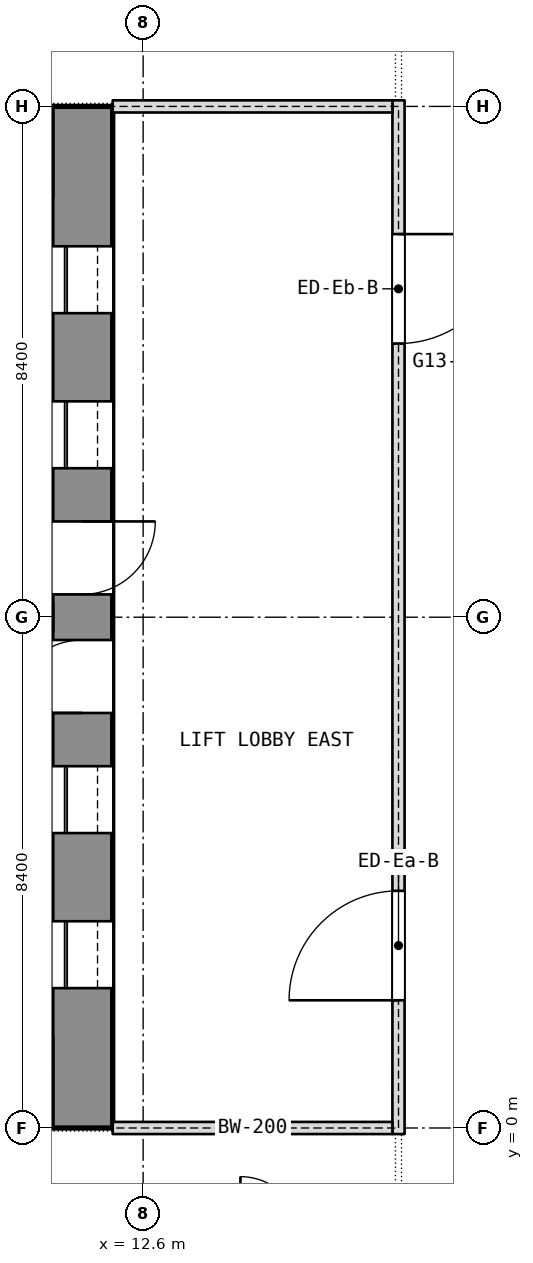
"""IFC4 building model, lengths in metres.
Left out: names, types, materials, properties, quantities, classifications, styles, units other than length and angle.
Written with IfcOpenShell. Run it as: python <this file> out.ifc"""

import sys

from ifc_helpers import new_model, si_unit, direction, frame, frame_2d, origin, place, context, subcontext, project, spatial, rectangle, extrude, element, fill, save


model = new_model("IFC4")
c1 = context("Model", 3, precision=1e-05, world=origin(), true_north=direction((0.0, 1.0)))
c2 = subcontext(c1, "Body", "Model", "MODEL_VIEW")
j1 = project(units=[si_unit("LENGTHUNIT", "METRE"), si_unit("PLANEANGLEUNIT", "RADIAN")], contexts=[c1])
p1 = place(None, origin())
s1 = spatial("IfcSite", under=j1, at=p1, CompositionType="ELEMENT")
p2 = place(p1, origin())
s2 = spatial("IfcBuilding", under=s1, at=p2, CompositionType="ELEMENT")
p3 = place(p2, frame((0.0, 0.0, 155.3)))
s3 = spatial("IfcBuildingStorey", under=s2, at=p3, CompositionType="ELEMENT", Elevation=155.3)
p4 = place(p3, frame((11.6, 0.0, 0.0), z_axis=(0.0, 0.0, 1.0), x_axis=(0.0, 1.0, 0.0)))
e1 = element("IfcWall", 1, at=p4, inside=s3, PredefinedType="SHEAR", context=c2, shape_type="SweptSolid", body=[
    extrude(rectangle(XDim=16.8, YDim=1.0, at=frame_2d((8.4, 0.0))), origin(), (0.0, 0.0, 1.0), 3.6),
])
p5 = place(p4, frame((2.3, 0.0, 0.0)))
e2 = element("IfcOpeningElement", 2, at=p5, cuts=e1, PredefinedType="OPENING", context=c2, shape_type="SweptSolid", body=[
    extrude(rectangle(XDim=1.1, YDim=2.1, at=frame_2d((0.55, 1.05))), frame((0.0, 0.5, 0.0), z_axis=(0.0, -1.0, 0.0), x_axis=(1.0, 0.0, 0.0)), (0.0, 0.0, 1.0), 1.0),
])
p6 = place(p4, frame((4.85, 0.0, 0.0)))
e3 = element("IfcOpeningElement", 3, at=p6, cuts=e1, PredefinedType="OPENING", context=c2, shape_type="SweptSolid", body=[
    extrude(rectangle(XDim=1.1, YDim=2.1, at=frame_2d((0.55, 1.05))), frame((0.0, 0.5, 0.0), z_axis=(0.0, -1.0, 0.0), x_axis=(1.0, 0.0, 0.0)), (0.0, 0.0, 1.0), 1.0),
])
p7 = place(p4, frame((6.825, 0.0, 0.0)))
e4 = element("IfcOpeningElement", 4, at=p7, cuts=e1, PredefinedType="OPENING", context=c2, shape_type="SweptSolid", body=[
    extrude(rectangle(XDim=1.2, YDim=2.1, at=frame_2d((0.6, 1.05))), frame((0.0, 0.5, 0.0), z_axis=(0.0, -1.0, 0.0), x_axis=(1.0, 0.0, 0.0)), (0.0, 0.0, 1.0), 1.0),
])
p8 = place(p4, frame((13.4, 0.0, 0.0)))
e5 = element("IfcOpeningElement", 5, at=p8, cuts=e1, PredefinedType="OPENING", context=c2, shape_type="SweptSolid", body=[
    extrude(rectangle(XDim=1.1, YDim=2.1, at=frame_2d((0.55, 1.05))), frame((0.0, 0.5, 0.0), z_axis=(0.0, -1.0, 0.0), x_axis=(1.0, 0.0, 0.0)), (0.0, 0.0, 1.0), 1.0),
])
p9 = place(p4, frame((10.85, 0.0, 0.0)))
e6 = element("IfcOpeningElement", 6, at=p9, cuts=e1, PredefinedType="OPENING", context=c2, shape_type="SweptSolid", body=[
    extrude(rectangle(XDim=1.1, YDim=2.1, at=frame_2d((0.55, 1.05))), frame((0.0, 0.5, 0.0), z_axis=(0.0, -1.0, 0.0), x_axis=(1.0, 0.0, 0.0)), (0.0, 0.0, 1.0), 1.0),
])
p10 = place(p4, frame((8.775, 0.0, 0.0)))
e7 = element("IfcOpeningElement", 7, at=p10, cuts=e1, PredefinedType="OPENING", context=c2, shape_type="SweptSolid", body=[
    extrude(rectangle(XDim=1.2, YDim=2.1, at=frame_2d((0.6, 1.05))), frame((0.0, 0.5, 0.0), z_axis=(0.0, -1.0, 0.0), x_axis=(1.0, 0.0, 0.0)), (0.0, 0.0, 1.0), 1.0),
])
p11 = place(p3, frame((16.8, -0.1, 0.0), z_axis=(0.0, 0.0, 1.0), x_axis=(0.0, 1.0, 0.0)))
e8 = element("IfcWall", 8, at=p11, inside=s3, PredefinedType="PARTITIONING", context=c2, shape_type="SweptSolid", body=[
    extrude(rectangle(XDim=17.0, YDim=0.2, at=frame_2d((8.5, 0.0))), origin(), (0.0, 0.0, 1.0), 3.34),
])
p12 = place(p11, frame((2.2, 0.0, 0.0)))
e9 = element("IfcOpeningElement", 9, at=p12, cuts=e8, PredefinedType="OPENING", context=c2, shape_type="SweptSolid", body=[
    extrude(rectangle(XDim=1.8, YDim=2.1, at=frame_2d((0.9, 1.05))), frame((0.0, 0.1, 0.0), z_axis=(0.0, -1.0, 0.0), x_axis=(1.0, 0.0, 0.0)), (0.0, 0.0, 1.0), 0.2),
])
p13 = place(p11, frame((13.0, 0.0, 0.0)))
e10 = element("IfcOpeningElement", 10, at=p13, cuts=e8, PredefinedType="OPENING", context=c2, shape_type="SweptSolid", body=[
    extrude(rectangle(XDim=1.8, YDim=2.1, at=frame_2d((0.9, 1.05))), frame((0.0, 0.1, 0.0), z_axis=(0.0, -1.0, 0.0), x_axis=(1.0, 0.0, 0.0)), (0.0, 0.0, 1.0), 0.2),
])
for number, where, z_axis, x_axis in (
    (11, (12.1, 0.0, 0.0), (0.0, 0.0, 1.0), (1.0, 0.0, 0.0)),
    (12, (12.1, 16.8, 0.0), (0.0, 0.0, 1.0), (1.0, 0.0, 0.0)),
):
    element("IfcWall", number, at=place(p3, frame(where, z_axis=z_axis, x_axis=x_axis)), inside=s3, PredefinedType="PARTITIONING", context=c2, shape_type="SweptSolid", body=[
        extrude(rectangle(XDim=4.6, YDim=0.2, at=frame_2d((2.3, 0.0))), origin(), (0.0, 0.0, 1.0), 2.89),
    ])
p14 = place(p5, origin())
e13 = element("IfcDoor", 13, at=p14, inside=s3, OperationType="SLIDING_TO_LEFT", PredefinedType="DOOR", context=c2, shape_type="SweptSolid", body=[
    extrude(rectangle(XDim=1.1, YDim=2.1, at=frame_2d((0.55, 1.05))), frame((0.0, 0.025, 0.0), z_axis=(0.0, -1.0, 0.0), x_axis=(1.0, 0.0, 0.0)), (0.0, 0.0, 1.0), 0.05),
])
fill(e2, e13)
p15 = place(p6, origin())
e14 = element("IfcDoor", 14, at=p15, inside=s3, OperationType="SLIDING_TO_LEFT", PredefinedType="DOOR", context=c2, shape_type="SweptSolid", body=[
    extrude(rectangle(XDim=1.1, YDim=2.1, at=frame_2d((0.55, 1.05))), frame((0.0, 0.025, 0.0), z_axis=(0.0, -1.0, 0.0), x_axis=(1.0, 0.0, 0.0)), (0.0, 0.0, 1.0), 0.05),
])
fill(e3, e14)
p16 = place(p7, origin())
e15 = element("IfcDoor", 15, at=p16, inside=s3, OperationType="SINGLE_SWING_LEFT", PredefinedType="DOOR", context=c2, shape_type="SweptSolid", body=[
    extrude(rectangle(XDim=1.2, YDim=2.1, at=frame_2d((0.6, 1.05))), frame((0.0, 0.025, 0.0), z_axis=(0.0, -1.0, 0.0), x_axis=(1.0, 0.0, 0.0)), (0.0, 0.0, 1.0), 0.05),
])
fill(e4, e15)
p17 = place(p8, origin())
e16 = element("IfcDoor", 16, at=p17, inside=s3, OperationType="SLIDING_TO_LEFT", PredefinedType="DOOR", context=c2, shape_type="SweptSolid", body=[
    extrude(rectangle(XDim=1.1, YDim=2.1, at=frame_2d((0.55, 1.05))), frame((0.0, 0.025, 0.0), z_axis=(0.0, -1.0, 0.0), x_axis=(1.0, 0.0, 0.0)), (0.0, 0.0, 1.0), 0.05),
])
fill(e5, e16)
p18 = place(p9, origin())
e17 = element("IfcDoor", 17, at=p18, inside=s3, OperationType="SLIDING_TO_LEFT", PredefinedType="DOOR", context=c2, shape_type="SweptSolid", body=[
    extrude(rectangle(XDim=1.1, YDim=2.1, at=frame_2d((0.55, 1.05))), frame((0.0, 0.025, 0.0), z_axis=(0.0, -1.0, 0.0), x_axis=(1.0, 0.0, 0.0)), (0.0, 0.0, 1.0), 0.05),
])
fill(e6, e17)
p19 = place(p10, origin())
e18 = element("IfcDoor", 18, at=p19, inside=s3, OperationType="SINGLE_SWING_LEFT", PredefinedType="DOOR", context=c2, shape_type="SweptSolid", body=[
    extrude(rectangle(XDim=1.2, YDim=2.1, at=frame_2d((0.6, 1.05))), frame((0.0, 0.025, 0.0), z_axis=(0.0, -1.0, 0.0), x_axis=(1.0, 0.0, 0.0)), (0.0, 0.0, 1.0), 0.05),
])
fill(e7, e18)
p20 = place(p12, origin())
e19 = element("IfcDoor", 19, at=p20, inside=s3, OperationType="DOUBLE_DOOR_SINGLE_SWING", PredefinedType="DOOR", context=c2, shape_type="SweptSolid", body=[
    extrude(rectangle(XDim=1.8, YDim=2.1, at=frame_2d((0.9, 1.05))), frame((0.0, 0.025, 0.0), z_axis=(0.0, -1.0, 0.0), x_axis=(1.0, 0.0, 0.0)), (0.0, 0.0, 1.0), 0.05),
])
fill(e9, e19)
p21 = place(p13, origin())
e20 = element("IfcDoor", 20, at=p21, inside=s3, OperationType="DOUBLE_DOOR_SINGLE_SWING", PredefinedType="DOOR", context=c2, shape_type="SweptSolid", body=[
    extrude(rectangle(XDim=1.8, YDim=2.1, at=frame_2d((0.9, 1.05))), frame((0.0, 0.025, 0.0), z_axis=(0.0, -1.0, 0.0), x_axis=(1.0, 0.0, 0.0)), (0.0, 0.0, 1.0), 0.05),
])
fill(e10, e20)
save(model, sys.argv[1])
